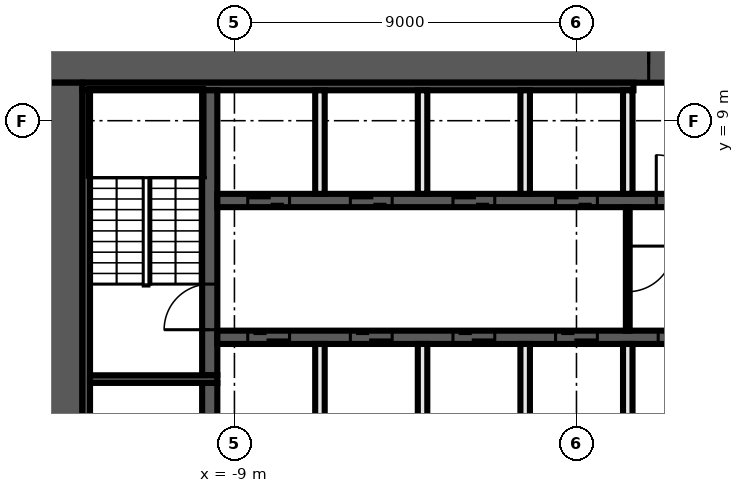
"""IFC4 building model, lengths in metres.
Left out: names, types, materials, properties, quantities, classifications, styles, units other than length and angle.
Written with IfcOpenShell. Run it as: python <this file> out.ifc"""

import sys

from ifc_helpers import new_model, si_unit, direction, frame, frame_2d, origin, place, context, subcontext, project, spatial, rectangle, extrude, element, fill, save


model = new_model("IFC4")
c1 = context("Model", 3, precision=1e-05, world=origin(), true_north=direction((0.0, 1.0)))
c2 = subcontext(c1, "Body", "Model", "MODEL_VIEW")
j1 = project(units=[si_unit("LENGTHUNIT", "METRE"), si_unit("PLANEANGLEUNIT", "RADIAN")], contexts=[c1])
p1 = place(None, origin())
s1 = spatial("IfcSite", under=j1, at=p1, CompositionType="ELEMENT")
p2 = place(p1, origin())
s2 = spatial("IfcBuilding", under=s1, at=p2, CompositionType="ELEMENT")
p3 = place(p2, frame((0.0, 0.0, 135.9)))
s3 = spatial("IfcBuildingStorey", under=s2, at=p3, CompositionType="ELEMENT", Elevation=135.9)
p4 = place(p3, frame((-14.0, 10.5, 0.0), z_axis=(0.0, 0.0, 1.0), x_axis=(1.0, 0.0, 0.0)))
e1 = element("IfcWall", 1, at=p4, inside=s3, PredefinedType="SHEAR", context=c2, shape_type="SweptSolid", body=[
    extrude(rectangle(XDim=28.0, YDim=1.0, at=frame_2d((14.0, 0.0))), origin(), (0.0, 0.0, 1.0), 3.3),
])
p5 = place(p4, frame((15.9, 0.0, 0.0)))
e2 = element("IfcOpeningElement", 2, at=p5, cuts=e1, PredefinedType="OPENING", context=c2, shape_type="SweptSolid", body=[
    extrude(rectangle(XDim=1.6, YDim=2.1, at=frame_2d((0.8, 1.05))), frame((0.0, 0.51, 0.0), z_axis=(0.0, -1.0, 0.0), x_axis=(1.0, 0.0, 0.0)), (0.0, 0.0, 1.0), 1.02),
])
p6 = place(p3, frame((-13.5, -10.0, 0.0), z_axis=(0.0, 0.0, 1.0), x_axis=(0.0, 1.0, 0.0)))
e3 = element("IfcWall", 3, at=p6, inside=s3, PredefinedType="SHEAR", context=c2, shape_type="SweptSolid", body=[
    extrude(rectangle(XDim=20.0, YDim=1.0, at=frame_2d((10.0, 0.0))), origin(), (0.0, 0.0, 1.0), 3.3),
])
p7 = place(p3, frame((-13.0, 9.9, 0.0), z_axis=(0.0, 0.0, 1.0), x_axis=(1.0, 0.0, 0.0)))
e4 = element("IfcWall", 4, at=p7, inside=s3, PredefinedType="SHEAR", context=c2, shape_type="SweptSolid", body=[
    extrude(rectangle(XDim=14.5, YDim=0.2, at=frame_2d((7.25, 0.0))), origin(), (0.0, 0.0, 1.0), 3.3),
])
p8 = place(p3, frame((-12.9, -9.8, 0.0), z_axis=(0.0, 0.0, 1.0), x_axis=(0.0, 1.0, 0.0)))
e5 = element("IfcWall", 5, at=p8, inside=s3, PredefinedType="SHEAR", context=c2, shape_type="SweptSolid", body=[
    extrude(rectangle(XDim=19.6, YDim=0.2, at=frame_2d((9.8, 0.0))), origin(), (0.0, 0.0, 1.0), 3.3),
])
p9 = place(p3, frame((-9.65, -2.1, 0.0), z_axis=(0.0, 0.0, 1.0), x_axis=(0.0, 1.0, 0.0)))
e6 = element("IfcWall", 6, at=p9, inside=s3, PredefinedType="SHEAR", context=c2, shape_type="SweptSolid", body=[
    extrude(rectangle(XDim=4.2, YDim=0.4, at=frame_2d((2.1, 0.0))), origin(), (0.0, 0.0, 1.0), 3.3),
])
p10 = place(p3, frame((-9.65, 2.3, 0.0), z_axis=(0.0, 0.0, 1.0), x_axis=(0.0, 1.0, 0.0)))
e7 = element("IfcWall", 7, at=p10, inside=s3, PredefinedType="SHEAR", context=c2, shape_type="SweptSolid", body=[
    extrude(rectangle(XDim=7.5, YDim=0.4, at=frame_2d((3.75, 0.0))), origin(), (0.0, 0.0, 1.0), 3.3),
])
p11 = place(p10, frame((1.2, 0.0, 0.0)))
e8 = element("IfcOpeningElement", 8, at=p11, cuts=e7, PredefinedType="OPENING", context=c2, shape_type="SweptSolid", body=[
    extrude(rectangle(XDim=1.2, YDim=2.1, at=frame_2d((0.6, 1.05))), frame((0.0, 0.21, 0.0), z_axis=(0.0, -1.0, 0.0), x_axis=(1.0, 0.0, 0.0)), (0.0, 0.0, 1.0), 0.42),
])
p12 = place(p3, frame((-9.45, 2.2, 0.0), z_axis=(0.0, 0.0, 1.0), x_axis=(-1.0, 0.0, 0.0)))
e9 = element("IfcWall", 9, at=p12, inside=s3, PredefinedType="SHEAR", context=c2, shape_type="SweptSolid", body=[
    extrude(rectangle(XDim=3.35, YDim=0.2, at=frame_2d((1.675, 0.0))), origin(), (0.0, 0.0, 1.0), 3.3),
])
p13 = place(p3, frame((-9.45, 6.9, 0.0), z_axis=(0.0, 0.0, 1.0), x_axis=(1.0, 0.0, 0.0)))
e10 = element("IfcWall", 10, at=p13, inside=s3, PredefinedType="SHEAR", context=c2, shape_type="SweptSolid", body=[
    extrude(rectangle(XDim=18.9, YDim=0.35, at=frame_2d((9.45, 0.0))), origin(), (0.0, 0.0, 1.0), 3.3),
])
p14 = place(p13, frame((0.8, 0.0, 0.0)))
e11 = element("IfcOpeningElement", 11, at=p14, cuts=e10, PredefinedType="OPENING", context=c2, shape_type="SweptSolid", body=[
    extrude(rectangle(XDim=1.1, YDim=2.1, at=frame_2d((0.55, 1.05))), frame((0.0, 0.185, 0.0), z_axis=(0.0, -1.0, 0.0), x_axis=(1.0, 0.0, 0.0)), (0.0, 0.0, 1.0), 0.37),
])
p15 = place(p13, frame((3.5, 0.0, 0.0)))
e12 = element("IfcOpeningElement", 12, at=p15, cuts=e10, PredefinedType="OPENING", context=c2, shape_type="SweptSolid", body=[
    extrude(rectangle(XDim=1.1, YDim=2.1, at=frame_2d((0.55, 1.05))), frame((0.0, 0.185, 0.0), z_axis=(0.0, -1.0, 0.0), x_axis=(1.0, 0.0, 0.0)), (0.0, 0.0, 1.0), 0.37),
])
p16 = place(p13, frame((6.2, 0.0, 0.0)))
e13 = element("IfcOpeningElement", 13, at=p16, cuts=e10, PredefinedType="OPENING", context=c2, shape_type="SweptSolid", body=[
    extrude(rectangle(XDim=1.1, YDim=2.1, at=frame_2d((0.55, 1.05))), frame((0.0, 0.185, 0.0), z_axis=(0.0, -1.0, 0.0), x_axis=(1.0, 0.0, 0.0)), (0.0, 0.0, 1.0), 0.37),
])
p17 = place(p13, frame((8.9, 0.0, 0.0)))
e14 = element("IfcOpeningElement", 14, at=p17, cuts=e10, PredefinedType="OPENING", context=c2, shape_type="SweptSolid", body=[
    extrude(rectangle(XDim=1.1, YDim=2.1, at=frame_2d((0.55, 1.05))), frame((0.0, 0.185, 0.0), z_axis=(0.0, -1.0, 0.0), x_axis=(1.0, 0.0, 0.0)), (0.0, 0.0, 1.0), 0.37),
])
p18 = place(p13, frame((11.55, 0.0, 0.0)))
e15 = element("IfcOpeningElement", 15, at=p18, cuts=e10, PredefinedType="OPENING", context=c2, shape_type="SweptSolid", body=[
    extrude(rectangle(XDim=1.2, YDim=2.1, at=frame_2d((0.6, 1.05))), frame((0.0, 0.185, 0.0), z_axis=(0.0, -1.0, 0.0), x_axis=(1.0, 0.0, 0.0)), (0.0, 0.0, 1.0), 0.37),
])
p19 = place(p13, frame((14.3, 0.0, 0.0)))
e16 = element("IfcOpeningElement", 16, at=p19, cuts=e10, PredefinedType="OPENING", context=c2, shape_type="SweptSolid", body=[
    extrude(rectangle(XDim=1.1, YDim=2.1, at=frame_2d((0.55, 1.05))), frame((0.0, 0.185, 0.0), z_axis=(0.0, -1.0, 0.0), x_axis=(1.0, 0.0, 0.0)), (0.0, 0.0, 1.0), 0.37),
])
p20 = place(p13, frame((17.0, 0.0, 0.0)))
e17 = element("IfcOpeningElement", 17, at=p20, cuts=e10, PredefinedType="OPENING", context=c2, shape_type="SweptSolid", body=[
    extrude(rectangle(XDim=1.1, YDim=2.1, at=frame_2d((0.55, 1.05))), frame((0.0, 0.185, 0.0), z_axis=(0.0, -1.0, 0.0), x_axis=(1.0, 0.0, 0.0)), (0.0, 0.0, 1.0), 0.37),
])
p21 = place(p3, frame((9.45, 3.3, 0.0), z_axis=(0.0, 0.0, 1.0), x_axis=(-1.0, 0.0, 0.0)))
e18 = element("IfcWall", 18, at=p21, inside=s3, PredefinedType="SHEAR", context=c2, shape_type="SweptSolid", body=[
    extrude(rectangle(XDim=18.9, YDim=0.35, at=frame_2d((9.45, 0.0))), origin(), (0.0, 0.0, 1.0), 3.3),
])
p22 = place(p21, frame((17.0, 0.0, 0.0)))
e19 = element("IfcOpeningElement", 19, at=p22, cuts=e18, PredefinedType="OPENING", context=c2, shape_type="SweptSolid", body=[
    extrude(rectangle(XDim=1.1, YDim=2.1, at=frame_2d((0.55, 1.05))), frame((0.0, 0.185, 0.0), z_axis=(0.0, -1.0, 0.0), x_axis=(1.0, 0.0, 0.0)), (0.0, 0.0, 1.0), 0.37),
])
p23 = place(p21, frame((14.3, 0.0, 0.0)))
e20 = element("IfcOpeningElement", 20, at=p23, cuts=e18, PredefinedType="OPENING", context=c2, shape_type="SweptSolid", body=[
    extrude(rectangle(XDim=1.1, YDim=2.1, at=frame_2d((0.55, 1.05))), frame((0.0, 0.185, 0.0), z_axis=(0.0, -1.0, 0.0), x_axis=(1.0, 0.0, 0.0)), (0.0, 0.0, 1.0), 0.37),
])
p24 = place(p21, frame((11.6, 0.0, 0.0)))
e21 = element("IfcOpeningElement", 21, at=p24, cuts=e18, PredefinedType="OPENING", context=c2, shape_type="SweptSolid", body=[
    extrude(rectangle(XDim=1.1, YDim=2.1, at=frame_2d((0.55, 1.05))), frame((0.0, 0.185, 0.0), z_axis=(0.0, -1.0, 0.0), x_axis=(1.0, 0.0, 0.0)), (0.0, 0.0, 1.0), 0.37),
])
p25 = place(p21, frame((8.9, 0.0, 0.0)))
e22 = element("IfcOpeningElement", 22, at=p25, cuts=e18, PredefinedType="OPENING", context=c2, shape_type="SweptSolid", body=[
    extrude(rectangle(XDim=1.1, YDim=2.1, at=frame_2d((0.55, 1.05))), frame((0.0, 0.185, 0.0), z_axis=(0.0, -1.0, 0.0), x_axis=(1.0, 0.0, 0.0)), (0.0, 0.0, 1.0), 0.37),
])
p26 = place(p21, frame((6.2, 0.0, 0.0)))
e23 = element("IfcOpeningElement", 23, at=p26, cuts=e18, PredefinedType="OPENING", context=c2, shape_type="SweptSolid", body=[
    extrude(rectangle(XDim=1.1, YDim=2.1, at=frame_2d((0.55, 1.05))), frame((0.0, 0.185, 0.0), z_axis=(0.0, -1.0, 0.0), x_axis=(1.0, 0.0, 0.0)), (0.0, 0.0, 1.0), 0.37),
])
p27 = place(p21, frame((3.5, 0.0, 0.0)))
e24 = element("IfcOpeningElement", 24, at=p27, cuts=e18, PredefinedType="OPENING", context=c2, shape_type="SweptSolid", body=[
    extrude(rectangle(XDim=1.1, YDim=2.1, at=frame_2d((0.55, 1.05))), frame((0.0, 0.185, 0.0), z_axis=(0.0, -1.0, 0.0), x_axis=(1.0, 0.0, 0.0)), (0.0, 0.0, 1.0), 0.37),
])
p28 = place(p21, frame((0.9, 0.0, 0.0)))
e25 = element("IfcOpeningElement", 25, at=p28, cuts=e18, PredefinedType="OPENING", context=c2, shape_type="SweptSolid", body=[
    extrude(rectangle(XDim=0.9, YDim=2.1, at=frame_2d((0.45, 1.05))), frame((0.0, 0.185, 0.0), z_axis=(0.0, -1.0, 0.0), x_axis=(1.0, 0.0, 0.0)), (0.0, 0.0, 1.0), 0.37),
])
p29 = place(p3, frame((1.35, 6.725, 0.0), z_axis=(0.0, 0.0, 1.0), x_axis=(0.0, -1.0, 0.0)))
e26 = element("IfcWall", 26, at=p29, inside=s3, PredefinedType="PARTITIONING", context=c2, shape_type="SweptSolid", body=[
    extrude(rectangle(XDim=3.25, YDim=0.1, at=frame_2d((1.625, 0.0))), origin(), (0.0, 0.0, 1.0), 3.3),
])
p30 = place(p29, frame((1.025, 0.0, 0.0)))
e27 = element("IfcOpeningElement", 27, at=p30, cuts=e26, PredefinedType="OPENING", context=c2, shape_type="SweptSolid", body=[
    extrude(rectangle(XDim=1.2, YDim=2.1, at=frame_2d((0.6, 1.05))), frame((0.0, 0.06, 0.0), z_axis=(0.0, -1.0, 0.0), x_axis=(1.0, 0.0, 0.0)), (0.0, 0.0, 1.0), 0.12),
])
for number, where, z_axis, x_axis in (
    (28, (1.35, 0.4, 0.0), (0.0, 0.0, 1.0), (0.0, 1.0, 0.0)),
    (29, (1.35, 7.075, 0.0), (0.0, 0.0, 1.0), (0.0, 1.0, 0.0)),
    (30, (-1.35, 0.4, 0.0), (0.0, 0.0, 1.0), (0.0, 1.0, 0.0)),
    (31, (-1.35, 7.075, 0.0), (0.0, 0.0, 1.0), (0.0, 1.0, 0.0)),
    (32, (-4.05, 0.4, 0.0), (0.0, 0.0, 1.0), (0.0, 1.0, 0.0)),
    (33, (-4.05, 7.075, 0.0), (0.0, 0.0, 1.0), (0.0, 1.0, 0.0)),
    (34, (-6.75, 0.4, 0.0), (0.0, 0.0, 1.0), (0.0, 1.0, 0.0)),
    (35, (-6.75, 7.075, 0.0), (0.0, 0.0, 1.0), (0.0, 1.0, 0.0)),
):
    element("IfcWall", number, at=place(p3, frame(where, z_axis=z_axis, x_axis=x_axis)), inside=s3, PredefinedType="SOLIDWALL", context=c2, shape_type="SweptSolid", body=[
        extrude(rectangle(XDim=2.725, YDim=0.25, at=frame_2d((1.363, 0.0))), origin(), (0.0, 0.0, 1.0), 3.3),
    ])
p31 = place(p14, origin())
e36 = element("IfcDoor", 36, at=p31, inside=s3, OperationType="DOUBLE_DOOR_SLIDING", PredefinedType="DOOR", context=c2, shape_type="SweptSolid", body=[
    extrude(rectangle(XDim=1.1, YDim=2.1, at=frame_2d((0.55, 1.05))), frame((0.0, 0.025, 0.0), z_axis=(0.0, -1.0, 0.0), x_axis=(1.0, 0.0, 0.0)), (0.0, 0.0, 1.0), 0.05),
])
fill(e11, e36)
p32 = place(p15, origin())
e37 = element("IfcDoor", 37, at=p32, inside=s3, OperationType="DOUBLE_DOOR_SLIDING", PredefinedType="DOOR", context=c2, shape_type="SweptSolid", body=[
    extrude(rectangle(XDim=1.1, YDim=2.1, at=frame_2d((0.55, 1.05))), frame((0.0, 0.025, 0.0), z_axis=(0.0, -1.0, 0.0), x_axis=(1.0, 0.0, 0.0)), (0.0, 0.0, 1.0), 0.05),
])
fill(e12, e37)
p33 = place(p16, origin())
e38 = element("IfcDoor", 38, at=p33, inside=s3, OperationType="DOUBLE_DOOR_SLIDING", PredefinedType="DOOR", context=c2, shape_type="SweptSolid", body=[
    extrude(rectangle(XDim=1.1, YDim=2.1, at=frame_2d((0.55, 1.05))), frame((0.0, 0.025, 0.0), z_axis=(0.0, -1.0, 0.0), x_axis=(1.0, 0.0, 0.0)), (0.0, 0.0, 1.0), 0.05),
])
fill(e13, e38)
p34 = place(p17, origin())
e39 = element("IfcDoor", 39, at=p34, inside=s3, OperationType="DOUBLE_DOOR_SLIDING", PredefinedType="DOOR", context=c2, shape_type="SweptSolid", body=[
    extrude(rectangle(XDim=1.1, YDim=2.1, at=frame_2d((0.55, 1.05))), frame((0.0, 0.025, 0.0), z_axis=(0.0, -1.0, 0.0), x_axis=(1.0, 0.0, 0.0)), (0.0, 0.0, 1.0), 0.05),
])
fill(e14, e39)
p35 = place(p5, origin())
e40 = element("IfcDoor", 40, at=p35, inside=s3, OperationType="DOUBLE_DOOR_SINGLE_SWING", PredefinedType="DOOR", context=c2, shape_type="SweptSolid", body=[
    extrude(rectangle(XDim=1.6, YDim=2.1, at=frame_2d((0.8, 1.05))), frame((0.0, 0.025, 0.0), z_axis=(0.0, -1.0, 0.0), x_axis=(1.0, 0.0, 0.0)), (0.0, 0.0, 1.0), 0.05),
])
fill(e2, e40)
p36 = place(p18, origin())
e41 = element("IfcDoor", 41, at=p36, inside=s3, OperationType="SINGLE_SWING_LEFT", PredefinedType="DOOR", context=c2, shape_type="SweptSolid", body=[
    extrude(rectangle(XDim=1.2, YDim=2.1, at=frame_2d((0.6, 1.05))), frame((0.0, 0.025, 0.0), z_axis=(0.0, -1.0, 0.0), x_axis=(1.0, 0.0, 0.0)), (0.0, 0.0, 1.0), 0.05),
])
fill(e15, e41)
p37 = place(p22, origin())
e42 = element("IfcDoor", 42, at=p37, inside=s3, OperationType="DOUBLE_DOOR_SLIDING", PredefinedType="DOOR", context=c2, shape_type="SweptSolid", body=[
    extrude(rectangle(XDim=1.1, YDim=2.1, at=frame_2d((0.55, 1.05))), frame((0.0, 0.025, 0.0), z_axis=(0.0, -1.0, 0.0), x_axis=(1.0, 0.0, 0.0)), (0.0, 0.0, 1.0), 0.05),
])
fill(e19, e42)
p38 = place(p23, origin())
e43 = element("IfcDoor", 43, at=p38, inside=s3, OperationType="DOUBLE_DOOR_SLIDING", PredefinedType="DOOR", context=c2, shape_type="SweptSolid", body=[
    extrude(rectangle(XDim=1.1, YDim=2.1, at=frame_2d((0.55, 1.05))), frame((0.0, 0.025, 0.0), z_axis=(0.0, -1.0, 0.0), x_axis=(1.0, 0.0, 0.0)), (0.0, 0.0, 1.0), 0.05),
])
fill(e20, e43)
p39 = place(p24, origin())
e44 = element("IfcDoor", 44, at=p39, inside=s3, OperationType="DOUBLE_DOOR_SLIDING", PredefinedType="DOOR", context=c2, shape_type="SweptSolid", body=[
    extrude(rectangle(XDim=1.1, YDim=2.1, at=frame_2d((0.55, 1.05))), frame((0.0, 0.025, 0.0), z_axis=(0.0, -1.0, 0.0), x_axis=(1.0, 0.0, 0.0)), (0.0, 0.0, 1.0), 0.05),
])
fill(e21, e44)
p40 = place(p25, origin())
e45 = element("IfcDoor", 45, at=p40, inside=s3, OperationType="DOUBLE_DOOR_SLIDING", PredefinedType="DOOR", context=c2, shape_type="SweptSolid", body=[
    extrude(rectangle(XDim=1.1, YDim=2.1, at=frame_2d((0.55, 1.05))), frame((0.0, 0.025, 0.0), z_axis=(0.0, -1.0, 0.0), x_axis=(1.0, 0.0, 0.0)), (0.0, 0.0, 1.0), 0.05),
])
fill(e22, e45)
p41 = place(p26, origin())
e46 = element("IfcDoor", 46, at=p41, inside=s3, OperationType="DOUBLE_DOOR_SLIDING", PredefinedType="DOOR", context=c2, shape_type="SweptSolid", body=[
    extrude(rectangle(XDim=1.1, YDim=2.1, at=frame_2d((0.55, 1.05))), frame((0.0, 0.025, 0.0), z_axis=(0.0, -1.0, 0.0), x_axis=(1.0, 0.0, 0.0)), (0.0, 0.0, 1.0), 0.05),
])
fill(e23, e46)
p42 = place(p11, origin())
e47 = element("IfcDoor", 47, at=p42, inside=s3, OperationType="SINGLE_SWING_RIGHT", PredefinedType="DOOR", context=c2, shape_type="SweptSolid", body=[
    extrude(rectangle(XDim=1.2, YDim=2.1, at=frame_2d((0.6, 1.05))), frame((0.0, 0.025, 0.0), z_axis=(0.0, -1.0, 0.0), x_axis=(1.0, 0.0, 0.0)), (0.0, 0.0, 1.0), 0.05),
])
fill(e8, e47)
p43 = place(p30, origin())
e48 = element("IfcDoor", 48, at=p43, inside=s3, OperationType="SINGLE_SWING_LEFT", PredefinedType="DOOR", context=c2, shape_type="SweptSolid", body=[
    extrude(rectangle(XDim=1.2, YDim=2.1, at=frame_2d((0.6, 1.05))), frame((0.0, 0.025, 0.0), z_axis=(0.0, -1.0, 0.0), x_axis=(1.0, 0.0, 0.0)), (0.0, 0.0, 1.0), 0.05),
])
fill(e27, e48)
save(model, sys.argv[1])
